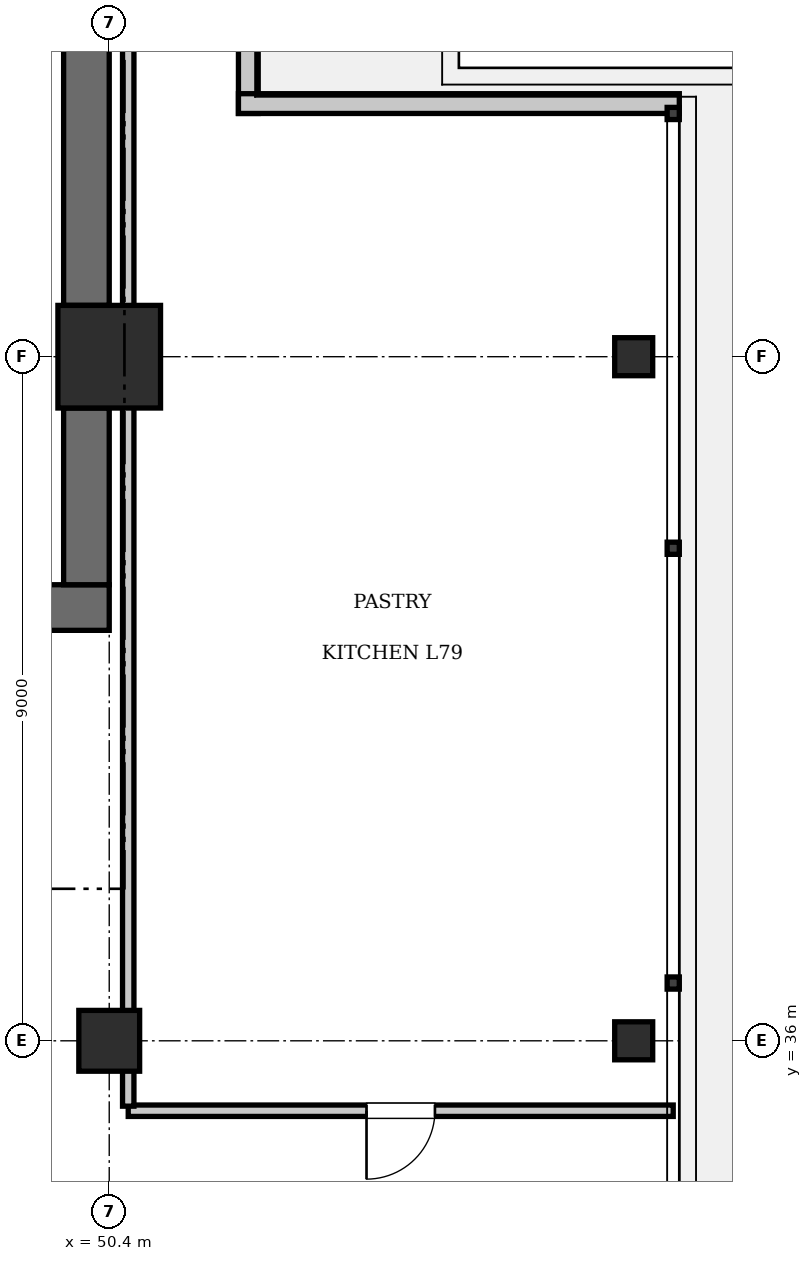
"""IFC4 building model, lengths in metres.
Left out: names, types, materials, properties, quantities, classifications, styles, units other than length and angle.
Written with IfcOpenShell. Run it as: python <this file> out.ifc"""

import sys

from ifc_helpers import new_model, si_unit, direction, frame, frame_2d, origin, origin_2d, place, context, subcontext, project, spatial, rectangle, i_section, extrude, element, fill, save


model = new_model("IFC4")
c1 = context("Model", 3, precision=1e-05, world=origin(), true_north=direction((0.0, 1.0)))
c2 = subcontext(c1, "Body", "Model", "MODEL_VIEW")
j1 = project(units=[si_unit("LENGTHUNIT", "METRE"), si_unit("PLANEANGLEUNIT", "RADIAN")], contexts=[c1])
p1 = place(None, origin())
s1 = spatial("IfcSite", under=j1, at=p1, CompositionType="ELEMENT")
p2 = place(p1, origin())
s2 = spatial("IfcBuilding", under=s1, at=p2, CompositionType="ELEMENT")
p3 = place(p2, frame((0.0, 0.0, 322.0)))
s3 = spatial("IfcBuildingStorey", under=s2, at=p3, CompositionType="ELEMENT", Elevation=322.0)
p4 = place(p3, frame((50.4, 45.0, 0.0), z_axis=(0.0, 0.0, 1.0), x_axis=(1.0, 0.0, 0.0)))
e1 = element("IfcColumn", 1, at=p4, inside=s3, PredefinedType="COLUMN", context=c2, shape_type="SweptSolid", body=[
    extrude(rectangle(XDim=1.35, YDim=1.35, at=origin_2d()), origin(), (0.0, 0.0, 1.0), 3.85),
])
p5 = place(p3, frame((43.6, 41.7, 0.0), z_axis=(0.0, 0.0, 1.0), x_axis=(1.0, 0.0, 0.0)))
e2 = element("IfcWall", 2, at=p5, inside=s3, PredefinedType="SHEAR", context=c2, shape_type="SweptSolid", body=[
    extrude(rectangle(XDim=6.8, YDim=0.6, at=frame_2d((3.4, 0.0))), origin(), (0.0, 0.0, 1.0), 3.85),
])
p6 = place(p5, frame((3.9, 0.0, 0.0)))
e3 = element("IfcOpeningElement", 3, at=p6, cuts=e2, PredefinedType="OPENING", context=c2, shape_type="SweptSolid", body=[
    extrude(rectangle(XDim=1.15, YDim=2.15, at=frame_2d((0.575, 1.075))), frame((0.0, 0.31, 0.0), z_axis=(0.0, -1.0, 0.0), x_axis=(1.0, 0.0, 0.0)), (0.0, 0.0, 1.0), 0.62),
])
p7 = place(p5, frame((0.55, 0.0, 0.0)))
e4 = element("IfcOpeningElement", 4, at=p7, cuts=e2, PredefinedType="OPENING", context=c2, shape_type="SweptSolid", body=[
    extrude(rectangle(XDim=1.1, YDim=2.2, at=frame_2d((0.55, 1.1))), frame((0.0, 0.31, 0.0), z_axis=(0.0, -1.0, 0.0), x_axis=(1.0, 0.0, 0.0)), (0.0, 0.0, 1.0), 0.62),
])
p8 = place(p3, frame((50.1, 42.0, 0.0), z_axis=(0.0, 0.0, 1.0), x_axis=(0.0, 1.0, 0.0)))
e5 = element("IfcWall", 5, at=p8, inside=s3, PredefinedType="SHEAR", context=c2, shape_type="SweptSolid", body=[
    extrude(rectangle(XDim=2.325, YDim=0.6, at=frame_2d((1.163, 0.0))), origin(), (0.0, 0.0, 1.0), 3.85),
])
p9 = place(p3, frame((50.1, 45.675, 0.0), z_axis=(0.0, 0.0, 1.0), x_axis=(0.0, 1.0, 0.0)))
e6 = element("IfcWall", 6, at=p9, inside=s3, PredefinedType="SHEAR", context=c2, shape_type="SweptSolid", body=[
    extrude(rectangle(XDim=7.725, YDim=0.6, at=frame_2d((3.862, 0.0))), origin(), (0.0, 0.0, 1.0), 3.85),
])
p10 = place(p3, frame((50.4, 36.0, 0.0), z_axis=(0.0, 0.0, 1.0), x_axis=(1.0, 0.0, 0.0)))
e7 = element("IfcColumn", 7, at=p10, inside=s3, PredefinedType="COLUMN", context=c2, shape_type="SweptSolid", body=[
    extrude(rectangle(XDim=0.8, YDim=0.8, at=origin_2d()), origin(), (0.0, 0.0, 1.0), 3.85),
])
for number, where, z_axis, x_axis in (
    (8, (57.3, 36.0, -0.24), (0.0, 0.0, 1.0), (1.0, 0.0, 0.0)),
    (9, (57.3, 45.0, -0.24), (0.0, 0.0, 1.0), (1.0, 0.0, 0.0)),
):
    element("IfcColumn", number, at=place(p3, frame(where, z_axis=z_axis, x_axis=x_axis)), inside=s3, PredefinedType="COLUMN", context=c2, shape_type="SweptSolid", body=[
        extrude(i_section(OverallWidth=0.5, OverallDepth=0.5, WebThickness=0.022, FlangeThickness=0.032, at=origin_2d()), origin(), (0.0, 0.0, 1.0), 4.09),
    ])
p11 = place(p3, frame((52.23, 54.0, 0.0), z_axis=(0.0, 0.0, 1.0), x_axis=(0.0, -1.0, 0.0)))
e10 = element("IfcWall", 10, at=p11, inside=s3, PredefinedType="SOLIDWALL", context=c2, shape_type="SweptSolid", body=[
    extrude(rectangle(XDim=5.8, YDim=0.26, at=frame_2d((2.9, 0.0))), origin(), (0.0, 0.0, 1.0), 3.61),
])
p12 = place(p3, frame((52.1, 48.33, 0.0), z_axis=(0.0, 0.0, 1.0), x_axis=(1.0, 0.0, 0.0)))
e11 = element("IfcWall", 11, at=p12, inside=s3, PredefinedType="SOLIDWALL", context=c2, shape_type="SweptSolid", body=[
    extrude(rectangle(XDim=5.8, YDim=0.26, at=frame_2d((2.9, 0.0))), origin(), (0.0, 0.0, 1.0), 3.61),
])
p13 = place(p3, frame((50.65, 35.08, 0.0), z_axis=(0.0, 0.0, 1.0), x_axis=(1.0, 0.0, 0.0)))
e12 = element("IfcWall", 12, at=p13, inside=s3, PredefinedType="PARTITIONING", context=c2, shape_type="SweptSolid", body=[
    extrude(rectangle(XDim=7.17, YDim=0.15, at=frame_2d((3.585, 0.0))), origin(), (0.0, 0.0, 1.0), 3.61),
])
p14 = place(p13, frame((3.135, 0.0, 0.0)))
e13 = element("IfcOpeningElement", 13, at=p14, cuts=e12, PredefinedType="OPENING", context=c2, shape_type="SweptSolid", body=[
    extrude(rectangle(XDim=0.9, YDim=2.1, at=frame_2d((0.45, 1.05))), frame((0.0, 0.085, 0.0), z_axis=(0.0, -1.0, 0.0), x_axis=(1.0, 0.0, 0.0)), (0.0, 0.0, 1.0), 0.17),
])
p15 = place(p3, frame((50.65, 35.14, 0.0), z_axis=(0.0, 0.0, 1.0), x_axis=(0.0, 1.0, 0.0)))
e14 = element("IfcWall", 14, at=p15, inside=s3, PredefinedType="PARTITIONING", context=c2, shape_type="SweptSolid", body=[
    extrude(rectangle(XDim=18.78, YDim=0.15, at=frame_2d((9.39, 0.0))), origin(), (0.0, 0.0, 1.0), 3.61),
])
p16 = place(p14, frame((0.9, 0.0, 0.0), z_axis=(0.0, 0.0, 1.0), x_axis=(-1.0, 0.0, 0.0)))
e15 = element("IfcDoor", 15, at=p16, inside=s3, OperationType="SINGLE_SWING_RIGHT", PredefinedType="DOOR", context=c2, shape_type="SweptSolid", body=[
    extrude(rectangle(XDim=0.9, YDim=2.1, at=frame_2d((0.45, 1.05))), frame((0.0, 0.025, 0.0), z_axis=(0.0, -1.0, 0.0), x_axis=(1.0, 0.0, 0.0)), (0.0, 0.0, 1.0), 0.05),
])
fill(e13, e15)
save(model, sys.argv[1])
